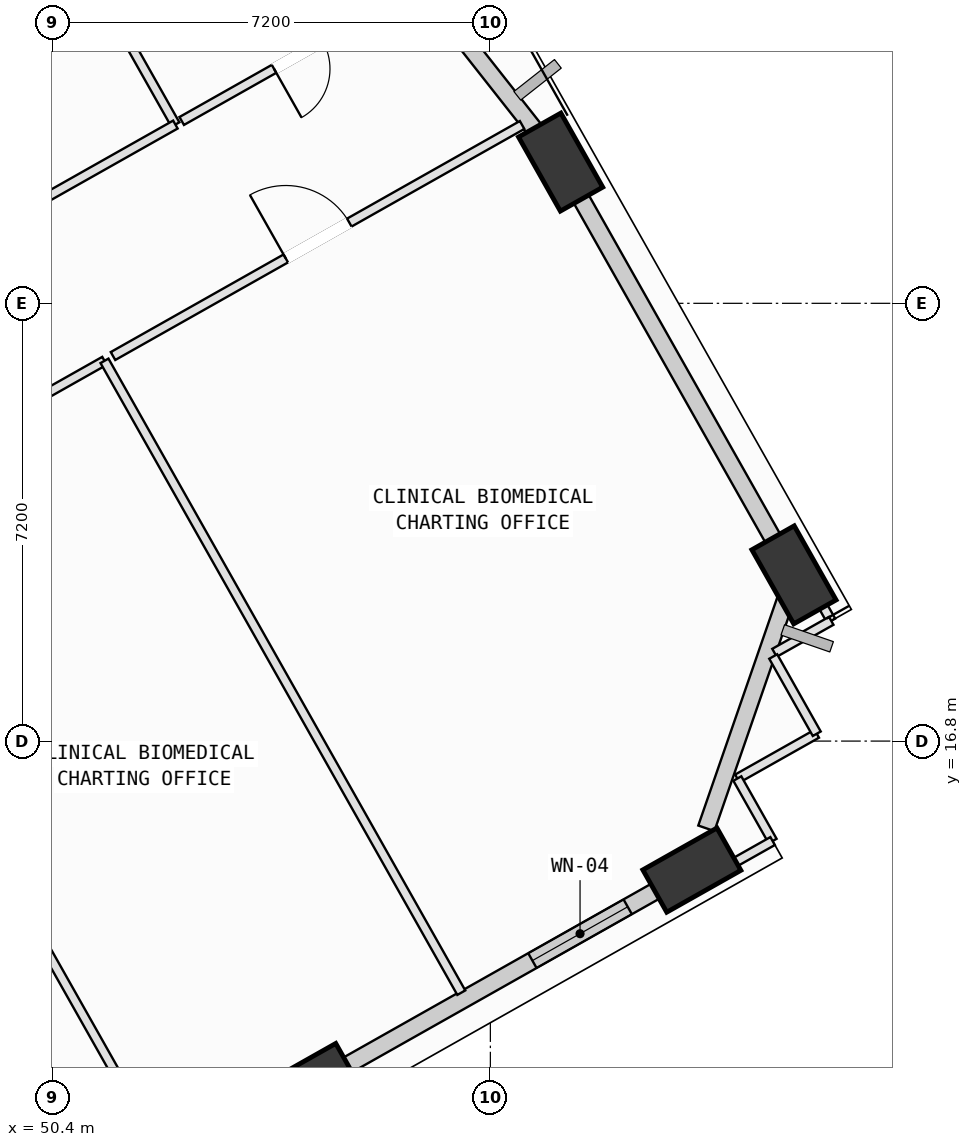
"""IFC4 building model, lengths in metres.
Left out: names, types, materials, properties, quantities, classifications, styles, units other than length and angle.
Written with IfcOpenShell. Run it as: python <this file> out.ifc"""

import sys

from ifc_helpers import new_model, si_unit, direction, frame, frame_2d, origin, origin_2d, place, context, subcontext, project, spatial, rectangle, extrude, element, fill, save


model = new_model("IFC4")
c1 = context("Model", 3, precision=1e-05, world=origin(), true_north=direction((0.0, 1.0)))
c2 = subcontext(c1, "Body", "Model", "MODEL_VIEW")
j1 = project(units=[si_unit("LENGTHUNIT", "METRE"), si_unit("PLANEANGLEUNIT", "RADIAN")], contexts=[c1])
p1 = place(None, origin())
s1 = spatial("IfcSite", under=j1, at=p1, CompositionType="ELEMENT")
p2 = place(p1, origin())
s2 = spatial("IfcBuilding", under=s1, at=p2, CompositionType="ELEMENT")
p3 = place(p2, frame((0.0, 0.0, 149.8)))
s3 = spatial("IfcBuildingStorey", under=s2, at=p3, CompositionType="ELEMENT", Elevation=149.8)
p4 = place(p3, frame((54.645, 11.135, 0.074), z_axis=(0.055632037053, 0.087253806723, 0.994631514515), x_axis=(-0.997144782381, 0.055801129661, 0.050877469454)))
e1 = element("IfcColumn", 1, at=p4, inside=s3, PredefinedType="COLUMN", context=c2, shape_type="SweptSolid", body=[
    extrude(rectangle(XDim=1.4, YDim=0.8, at=origin_2d()), origin(), (0.0, 0.0, 1.0), 3.945),
])
p5 = place(p3, frame((60.914, 14.678, 0.085), z_axis=(0.040762141013, 0.112746347484, 0.992787343286), x_axis=(-0.984868435796, -0.162971348998, 0.058944919876)))
e2 = element("IfcColumn", 2, at=p5, inside=s3, PredefinedType="COLUMN", context=c2, shape_type="SweptSolid", body=[
    extrude(rectangle(XDim=1.4, YDim=0.8, at=origin_2d()), origin(), (0.0, 0.0, 1.0), 3.941),
])
p6 = place(p3, frame((62.593, 19.534, 0.1), z_axis=(0.0207028818, 0.119492308766, 0.992619251693), x_axis=(0.336888766063, -0.935603610198, 0.1056022911)))
e3 = element("IfcColumn", 3, at=p6, inside=s3, PredefinedType="COLUMN", context=c2, shape_type="SweptSolid", body=[
    extrude(rectangle(XDim=1.4, YDim=0.8, at=origin_2d()), origin(), (0.0, 0.0, 1.0), 3.927),
])
p7 = place(p3, frame((58.756, 26.323, 0.086), z_axis=(-0.007138333207, 0.103661012665, 0.994587069417), x_axis=(0.550000990566, -0.830248298893, 0.090480232982)))
e4 = element("IfcColumn", 4, at=p7, inside=s3, PredefinedType="COLUMN", context=c2, shape_type="SweptSolid", body=[
    extrude(rectangle(XDim=1.4, YDim=0.8, at=origin_2d()), origin(), (0.0, 0.0, 1.0), 3.933),
])
p8 = place(p3, frame((60.66, 14.527, 0.0), z_axis=(0.0, 0.0, 1.0), x_axis=(-0.870773266838, -0.49168477479, 0.0)))
e5 = element("IfcWall", 5, at=p8, inside=s3, PredefinedType="SOLIDWALL", context=c2, shape_type="SweptSolid", body=[
    extrude(rectangle(XDim=6.242, YDim=0.28, at=frame_2d((3.121, 0.0))), origin(), (0.0, 0.0, 1.0), 3.165),
])
p9 = place(p8, frame((0.92, 0.0, 0.75)))
e6 = element("IfcOpeningElement", 6, at=p9, cuts=e5, PredefinedType="OPENING", context=c2, shape_type="SweptSolid", body=[
    extrude(rectangle(XDim=1.8, YDim=2.05, at=frame_2d((0.9, 1.025))), frame((0.0, 0.15, 0.0), z_axis=(0.0, -1.0, 0.0), x_axis=(1.0, 0.0, 0.0)), (0.0, 0.0, 1.0), 0.3),
])
p10 = place(p3, frame((62.508, 19.282, 0.0), z_axis=(0.0, 0.0, 1.0), x_axis=(-0.32730273806, -0.944919529727, 0.0)))
e7 = element("IfcWall", 7, at=p10, inside=s3, PredefinedType="SOLIDWALL", context=c2, shape_type="SweptSolid", body=[
    extrude(rectangle(XDim=4.145, YDim=0.28, at=frame_2d((2.073, 0.0))), origin(), (0.0, 0.0, 1.0), 3.165),
])
p11 = place(p3, frame((58.903, 26.053, 0.0), z_axis=(0.0, 0.0, 1.0), x_axis=(0.491677314886, -0.870777479053, 0.0)))
e8 = element("IfcWall", 8, at=p11, inside=s3, PredefinedType="SOLIDWALL", context=c2, shape_type="SweptSolid", body=[
    extrude(rectangle(XDim=6.84, YDim=0.28, at=frame_2d((3.42, 0.0))), origin(), (0.0, 0.0, 1.0), 3.165),
])
p12 = place(p3, frame((52.881, 33.769, 0.0), z_axis=(0.0, 0.0, 1.0), x_axis=(0.618971390847, -0.785413532677, 0.0)))
e9 = element("IfcWall", 9, at=p12, inside=s3, PredefinedType="SOLIDWALL", context=c2, shape_type="SweptSolid", body=[
    extrude(rectangle(XDim=8.838, YDim=0.28, at=frame_2d((4.419, 0.0))), origin(), (0.0, 0.0, 1.0), 3.165),
])
p13 = place(p3, frame((46.378, 20.301, 0.0), z_axis=(0.0, 0.0, 1.0), x_axis=(0.491699953703, -0.870764695844, 0.0)))
e10 = element("IfcWall", 10, at=p13, inside=s3, PredefinedType="PARTITIONING", context=c2, shape_type="SweptSolid", body=[
    extrude(rectangle(XDim=11.934, YDim=0.15, at=frame_2d((5.967, 0.0))), origin(), (0.0, 0.0, 1.0), 3.415),
])
p14 = place(p3, frame((46.517, 20.38, 0.0), z_axis=(0.0, 0.0, 1.0), x_axis=(0.870819350586, 0.491603151581, 0.0)))
e11 = element("IfcWall", 11, at=p14, inside=s3, PredefinedType="PARTITIONING", context=c2, shape_type="SweptSolid", body=[
    extrude(rectangle(XDim=5.439, YDim=0.15, at=frame_2d((2.72, 0.0))), origin(), (0.0, 0.0, 1.0), 2.765),
])
p15 = place(p14, frame((2.12, 0.0, 0.0)))
e12 = element("IfcOpeningElement", 12, at=p15, cuts=e11, PredefinedType="OPENING", context=c2, shape_type="SweptSolid", body=[
    extrude(rectangle(XDim=1.2, YDim=2.15, at=frame_2d((0.6, 1.075))), frame((0.0, 0.085, 0.0), z_axis=(0.0, -1.0, 0.0), x_axis=(1.0, 0.0, 0.0)), (0.0, 0.0, 1.0), 0.17),
])
p16 = place(p3, frame((51.254, 23.054, 0.0), z_axis=(0.0, 0.0, 1.0), x_axis=(0.49170871252, -0.870759749892, 0.0)))
e13 = element("IfcWall", 13, at=p16, inside=s3, PredefinedType="PARTITIONING", context=c2, shape_type="SweptSolid", body=[
    extrude(rectangle(XDim=11.934, YDim=0.15, at=frame_2d((5.967, 0.0))), origin(), (0.0, 0.0, 1.0), 3.78),
])
p17 = place(p3, frame((62.968, 16.921, 0.0), z_axis=(0.0, 0.0, 1.0), x_axis=(-0.870935586578, -0.491397195792, 0.0)))
e14 = element("IfcWall", 14, at=p17, inside=s3, PredefinedType="PARTITIONING", context=c2, shape_type="SweptSolid", body=[
    extrude(rectangle(XDim=1.5, YDim=0.15, at=frame_2d((0.75, 0.0))), origin(), (0.0, 0.0, 1.0), 3.78),
])
p18 = place(p3, frame((61.662, 16.184, 0.0), z_axis=(0.0, 0.0, 1.0), x_axis=(0.491252787864, -0.871017048292, 0.0)))
e15 = element("IfcWall", 15, at=p18, inside=s3, PredefinedType="PARTITIONING", context=c2, shape_type="SweptSolid", body=[
    extrude(rectangle(XDim=1.18, YDim=0.15, at=frame_2d((0.59, 0.0))), origin(), (0.0, 0.0, 1.0), 3.78),
])
p19 = place(p3, frame((62.242, 15.156, 0.0), z_axis=(0.0, 0.0, 1.0), x_axis=(-0.870867277829, -0.491518244226, 0.0)))
e16 = element("IfcWall", 16, at=p19, inside=s3, PredefinedType="PARTITIONING", context=c2, shape_type="SweptSolid", body=[
    extrude(rectangle(XDim=1.687, YDim=0.15, at=frame_2d((0.843, 0.0))), origin(), (0.0, 0.0, 1.0), 3.78),
])
p20 = place(p3, frame((51.394, 23.133, 0.0), z_axis=(0.0, 0.0, 1.0), x_axis=(0.870715207894, 0.491787582948, 0.0)))
e17 = element("IfcWall", 17, at=p20, inside=s3, PredefinedType="PARTITIONING", context=c2, shape_type="SweptSolid", body=[
    extrude(rectangle(XDim=7.727, YDim=0.15, at=frame_2d((3.864, 0.0))), origin(), (0.0, 0.0, 1.0), 2.765),
])
p21 = place(p20, frame((3.263, 0.0, 0.0)))
e18 = element("IfcOpeningElement", 18, at=p21, cuts=e17, PredefinedType="OPENING", context=c2, shape_type="SweptSolid", body=[
    extrude(rectangle(XDim=1.2, YDim=2.15, at=frame_2d((0.6, 1.075))), frame((0.0, 0.085, 0.0), z_axis=(0.0, -1.0, 0.0), x_axis=(1.0, 0.0, 0.0)), (0.0, 0.0, 1.0), 0.17),
])
p22 = place(p3, frame((58.566, 26.997, 0.0), z_axis=(0.0, 0.0, 1.0), x_axis=(0.491258667542, -0.871013732134, 0.0)))
e19 = element("IfcWall", 19, at=p22, inside=s3, PredefinedType="PARTITIONING", context=c2, shape_type="SweptSolid", body=[
    extrude(rectangle(XDim=0.988, YDim=0.15, at=frame_2d((0.494, 0.0))), origin(), (0.0, 0.0, 1.0), 3.165),
])
p23 = place(p3, frame((62.414, 20.181, 0.0), z_axis=(0.0, 0.0, 1.0), x_axis=(0.491627733162, -0.870805473103, 0.0)))
e20 = element("IfcWall", 20, at=p23, inside=s3, PredefinedType="PARTITIONING", context=c2, shape_type="SweptSolid", body=[
    extrude(rectangle(XDim=1.611, YDim=0.15, at=frame_2d((0.805, 0.0))), origin(), (0.0, 0.0, 1.0), 3.165),
])
p24 = place(p3, frame((63.206, 18.778, 0.0), z_axis=(0.0, 0.0, 1.0), x_axis=(-0.871075980592, -0.491148283144, 0.0)))
e21 = element("IfcWall", 21, at=p24, inside=s3, PredefinedType="PARTITIONING", context=c2, shape_type="SweptSolid", body=[
    extrude(rectangle(XDim=1.071, YDim=0.15, at=frame_2d((0.536, 0.0))), origin(), (0.0, 0.0, 1.0), 3.78),
])
p25 = place(p3, frame((62.252, 18.191, 0.0), z_axis=(0.0, 0.0, 1.0), x_axis=(0.491135517472, -0.871083178277, 0.0)))
e22 = element("IfcWall", 22, at=p25, inside=s3, PredefinedType="PARTITIONING", context=c2, shape_type="SweptSolid", body=[
    extrude(rectangle(XDim=1.458, YDim=0.15, at=frame_2d((0.729, 0.0))), origin(), (0.0, 0.0, 1.0), 3.78),
])
p26 = place(p3, frame((49.507, 32.099, 0.0), z_axis=(0.0, 0.0, 1.0), x_axis=(0.491645776878, -0.870795285976, 0.0)))
e23 = element("IfcWall", 23, at=p26, inside=s3, PredefinedType="PARTITIONING", context=c2, shape_type="SweptSolid", body=[
    extrude(rectangle(XDim=5.925, YDim=0.15, at=frame_2d((2.962, 0.0))), origin(), (0.0, 0.0, 1.0), 3.78),
])
p27 = place(p3, frame((52.42, 26.94, 0.0), z_axis=(0.0, 0.0, 1.0), x_axis=(-0.870751378519, -0.491723536967, 0.0)))
e24 = element("IfcWall", 24, at=p27, inside=s3, PredefinedType="PARTITIONING", context=c2, shape_type="SweptSolid", body=[
    extrude(rectangle(XDim=7.305, YDim=0.15, at=frame_2d((3.652, 0.0))), origin(), (0.0, 0.0, 1.0), 3.78),
])
p28 = place(p27, frame((3.052, 0.0, 0.0)))
e25 = element("IfcOpeningElement", 25, at=p28, cuts=e24, PredefinedType="OPENING", context=c2, shape_type="SweptSolid", body=[
    extrude(rectangle(XDim=1.2, YDim=2.15, at=frame_2d((0.6, 1.075))), frame((0.0, 0.085, 0.0), z_axis=(0.0, -1.0, 0.0), x_axis=(1.0, 0.0, 0.0)), (0.0, 0.0, 1.0), 0.17),
])
p29 = place(p3, frame((56.362, 29.166, 0.0), z_axis=(0.0, 0.0, 1.0), x_axis=(-0.870794858424, -0.49164653415, 0.0)))
e26 = element("IfcWall", 26, at=p29, inside=s3, PredefinedType="PARTITIONING", context=c2, shape_type="SweptSolid", body=[
    extrude(rectangle(XDim=4.408, YDim=0.15, at=frame_2d((2.204, 0.0))), origin(), (0.0, 0.0, 1.0), 3.78),
])
p30 = place(p29, frame((1.744, 0.0, 0.0)))
e27 = element("IfcOpeningElement", 27, at=p30, cuts=e26, PredefinedType="OPENING", context=c2, shape_type="SweptSolid", body=[
    extrude(rectangle(XDim=0.92, YDim=2.1, at=frame_2d((0.46, 1.05))), frame((0.0, 0.085, 0.0), z_axis=(0.0, -1.0, 0.0), x_axis=(1.0, 0.0, 0.0)), (0.0, 0.0, 1.0), 0.17),
])
p31 = place(p9, origin())
e28 = element("IfcWindow", 28, at=p31, inside=s3, PartitioningType="SINGLE_PANEL", PredefinedType="WINDOW", context=c2, shape_type="SweptSolid", body=[
    extrude(rectangle(XDim=1.8, YDim=2.05, at=frame_2d((0.9, 1.025))), frame((0.0, 0.03, 0.0), z_axis=(0.0, -1.0, 0.0), x_axis=(1.0, 0.0, 0.0)), (0.0, 0.0, 1.0), 0.06),
])
fill(e6, e28)
p32 = place(p21, origin())
e29 = element("IfcDoor", 29, at=p32, inside=s3, OperationType="SINGLE_SWING_LEFT", PredefinedType="DOOR", context=c2, shape_type="SweptSolid", body=[
    extrude(rectangle(XDim=1.2, YDim=2.15, at=frame_2d((0.6, 1.075))), frame((0.0, 0.025, 0.0), z_axis=(0.0, -1.0, 0.0), x_axis=(1.0, 0.0, 0.0)), (0.0, 0.0, 1.0), 0.05),
])
fill(e18, e29)
p33 = place(p30, origin())
e30 = element("IfcDoor", 30, at=p33, inside=s3, OperationType="SINGLE_SWING_RIGHT", PredefinedType="DOOR", context=c2, shape_type="SweptSolid", body=[
    extrude(rectangle(XDim=0.92, YDim=2.1, at=frame_2d((0.46, 1.05))), frame((0.0, 0.025, 0.0), z_axis=(0.0, -1.0, 0.0), x_axis=(1.0, 0.0, 0.0)), (0.0, 0.0, 1.0), 0.05),
])
fill(e27, e30)
save(model, sys.argv[1])
